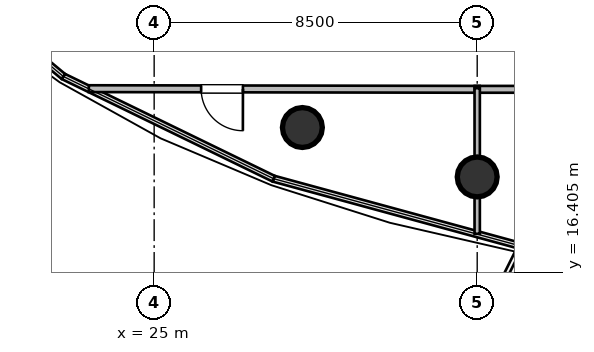
"""IFC4 building model, lengths in metres.
Left out: names, types, materials, properties, quantities, classifications, styles, units other than length and angle.
Written with IfcOpenShell. Run it as: python <this file> out.ifc"""

import sys

from ifc_helpers import new_model, si_unit, direction, frame, frame_2d, origin, origin_2d, place, context, subcontext, project, spatial, rectangle, circle, extrude, element, fill, save


model = new_model("IFC4")
c1 = context("Model", 3, precision=1e-05, world=origin(), true_north=direction((0.0, 1.0)))
c2 = subcontext(c1, "Body", "Model", "MODEL_VIEW")
j1 = project(units=[si_unit("LENGTHUNIT", "METRE"), si_unit("PLANEANGLEUNIT", "RADIAN")], contexts=[c1])
p1 = place(None, origin())
s1 = spatial("IfcSite", under=j1, at=p1, CompositionType="ELEMENT")
p2 = place(p1, origin())
s2 = spatial("IfcBuilding", under=s1, at=p2, CompositionType="ELEMENT")
p3 = place(p2, frame((0.0, 0.0, 231.6)))
s3 = spatial("IfcBuildingStorey", under=s2, at=p3, CompositionType="ELEMENT", Elevation=231.6)
for number, where, z_axis, x_axis in (
    (1, (28.9, 20.22, 0.0), (0.0, 0.0, 1.0), (1.0, 0.0, 0.0)),
    (2, (33.5, 18.92, 0.0), (0.0, 0.0, 1.0), (1.0, 0.0, 0.0)),
):
    element("IfcColumn", number, at=place(p3, frame(where, z_axis=z_axis, x_axis=x_axis)), inside=s3, PredefinedType="COLUMN", context=c2, shape_type="SweptSolid", body=[
        extrude(circle(Radius=0.525, at=origin_2d()), origin(), (0.0, 0.0, 1.0), 3.6),
    ])
p4 = place(p3, frame((33.565, 21.225, 0.0), z_axis=(0.0, 0.0, 1.0), x_axis=(-0.999998619279, 0.001661758222, 0.0)))
e3 = element("IfcWall", 3, at=p4, inside=s3, PredefinedType="PARTITIONING", context=c2, shape_type="SweptSolid", body=[
    extrude(rectangle(XDim=10.284, YDim=0.18, at=frame_2d((5.142, 0.0))), origin(), (0.0, 0.0, 1.0), 2.89),
])
p5 = place(p4, frame((6.229, 0.0, 0.0)))
e4 = element("IfcOpeningElement", 4, at=p5, cuts=e3, PredefinedType="OPENING", context=c2, shape_type="SweptSolid", body=[
    extrude(rectangle(XDim=1.1, YDim=2.1, at=frame_2d((0.55, 1.05))), frame((0.0, 0.1, 0.0), z_axis=(0.0, -1.0, 0.0), x_axis=(1.0, 0.0, 0.0)), (0.0, 0.0, 1.0), 0.2),
])
p6 = place(p3, frame((46.405, 21.225, 0.0), z_axis=(0.0, 0.0, 1.0), x_axis=(-1.0, 0.0, 0.0)))
e5 = element("IfcWall", 5, at=p6, inside=s3, PredefinedType="PARTITIONING", context=c2, shape_type="SweptSolid", body=[
    extrude(rectangle(XDim=12.97, YDim=0.18, at=frame_2d((6.485, 0.0))), origin(), (0.0, 0.0, 1.0), 2.996),
])
p7 = place(p6, frame((5.885, 0.0, 0.0)))
e6 = element("IfcOpeningElement", 6, at=p7, cuts=e5, PredefinedType="OPENING", context=c2, shape_type="SweptSolid", body=[
    extrude(rectangle(XDim=1.2, YDim=2.15, at=frame_2d((0.6, 1.075))), frame((0.0, 0.1, 0.0), z_axis=(0.0, -1.0, 0.0), x_axis=(1.0, 0.0, 0.0)), (0.0, 0.0, 1.0), 0.2),
])
p8 = place(p3, frame((33.5, 21.255, 0.0), z_axis=(0.0, 0.0, 1.0), x_axis=(0.0, -1.0, 0.0)))
e7 = element("IfcWall", 7, at=p8, inside=s3, PredefinedType="PARTITIONING", context=c2, shape_type="SweptSolid", body=[
    extrude(rectangle(XDim=3.831, YDim=0.14, at=frame_2d((1.916, 0.0))), origin(), (0.0, 0.0, 1.0), 3.36),
])
p9 = place(p5, origin())
e8 = element("IfcDoor", 8, at=p9, inside=s3, OperationType="SINGLE_SWING_LEFT", PredefinedType="DOOR", context=c2, shape_type="SweptSolid", body=[
    extrude(rectangle(XDim=1.1, YDim=2.1, at=frame_2d((0.55, 1.05))), frame((0.0, 0.025, 0.0), z_axis=(0.0, -1.0, 0.0), x_axis=(1.0, 0.0, 0.0)), (0.0, 0.0, 1.0), 0.05),
])
fill(e4, e8)
save(model, sys.argv[1])
